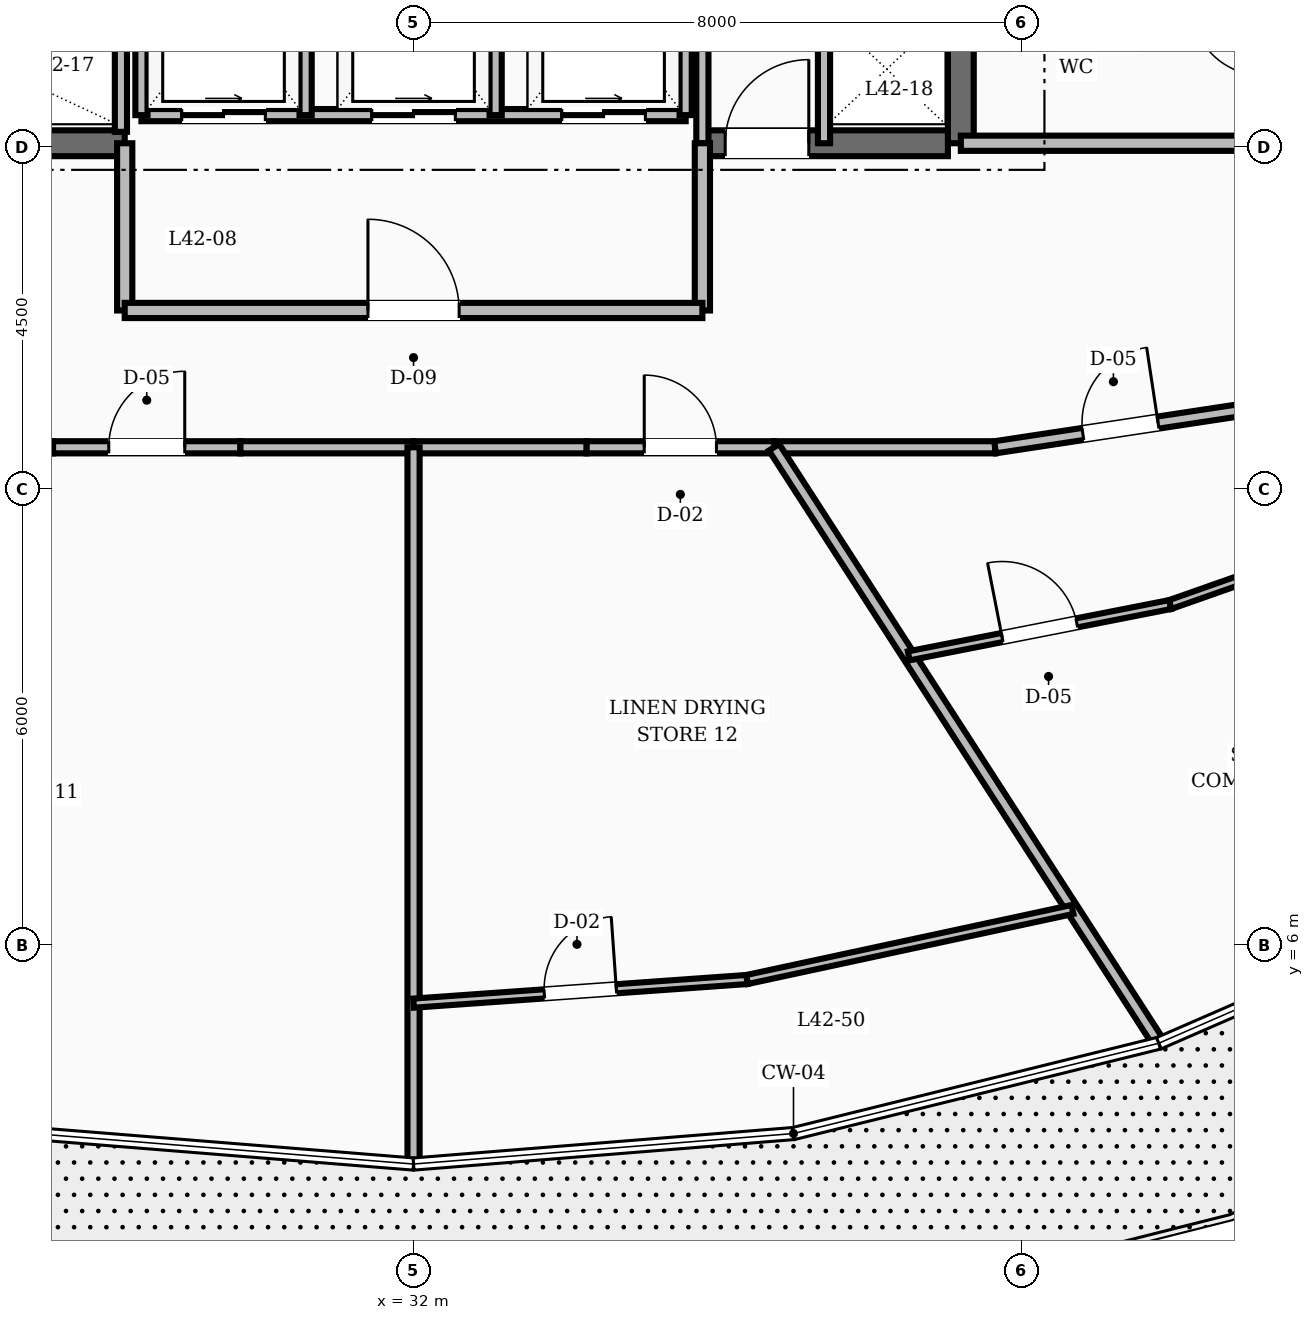
"""IFC4 building model, lengths in metres.
Left out: names, types, materials, properties, quantities, classifications, styles, units other than length and angle.
Written with IfcOpenShell. Run it as: python <this file> out.ifc"""

import sys

from ifc_helpers import new_model, si_unit, direction, frame, frame_2d, origin, place, context, subcontext, project, spatial, rectangle, extrude, element, fill, save


model = new_model("IFC4")
c1 = context("Model", 3, precision=1e-05, world=origin(), true_north=direction((0.0, 1.0)))
c2 = subcontext(c1, "Body", "Model", "MODEL_VIEW")
j1 = project(units=[si_unit("LENGTHUNIT", "METRE"), si_unit("PLANEANGLEUNIT", "RADIAN")], contexts=[c1])
p1 = place(None, origin())
s1 = spatial("IfcSite", under=j1, at=p1, CompositionType="ELEMENT")
p2 = place(p1, origin())
s2 = spatial("IfcBuilding", under=s1, at=p2, CompositionType="ELEMENT")
p3 = place(p2, frame((0.0, 0.0, 164.0)))
s3 = spatial("IfcBuildingStorey", under=s2, at=p3, CompositionType="ELEMENT", Elevation=164.0)
p4 = place(p3, frame((39.2, 16.55, 0.0), z_axis=(0.0, 0.0, 1.0), x_axis=(0.0, 1.0, 0.0)))
e1 = element("IfcWall", 1, at=p4, inside=s3, PredefinedType="SHEAR", context=c2, shape_type="SweptSolid", body=[
    extrude(rectangle(XDim=6.3, YDim=0.34, at=frame_2d((3.15, 0.0))), origin(), (0.0, 0.0, 1.0), 3.6),
])
p5 = place(p3, frame((24.97, 16.55, 0.0), z_axis=(0.0, 0.0, 1.0), x_axis=(1.0, 0.0, 0.0)))
e2 = element("IfcWall", 2, at=p5, inside=s3, PredefinedType="SHEAR", context=c2, shape_type="SweptSolid", body=[
    extrude(rectangle(XDim=3.23, YDim=0.34, at=frame_2d((1.615, 0.0))), origin(), (0.0, 0.0, 1.0), 3.6),
])
p6 = place(p3, frame((35.8, 16.55, 0.0), z_axis=(0.0, 0.0, 1.0), x_axis=(1.0, 0.0, 0.0)))
e3 = element("IfcWall", 3, at=p6, inside=s3, PredefinedType="SHEAR", context=c2, shape_type="SweptSolid", body=[
    extrude(rectangle(XDim=3.23, YDim=0.34, at=frame_2d((1.615, 0.0))), origin(), (0.0, 0.0, 1.0), 3.6),
])
p7 = place(p6, frame((0.3, 0.0, 0.0)))
e4 = element("IfcOpeningElement", 4, at=p7, cuts=e3, PredefinedType="OPENING", context=c2, shape_type="SweptSolid", body=[
    extrude(rectangle(XDim=1.1, YDim=2.1, at=frame_2d((0.55, 1.05))), frame((0.0, 0.18, 0.0), z_axis=(0.0, -1.0, 0.0), x_axis=(1.0, 0.0, 0.0)), (0.0, 0.0, 1.0), 0.36),
])
p8 = place(p3, frame((39.2, 16.55, 0.0), z_axis=(0.0, 0.0, 1.0), x_axis=(1.0, 0.0, 0.0)))
e5 = element("IfcWall", 5, at=p8, inside=s3, PredefinedType="SOLIDWALL", context=c2, shape_type="SweptSolid", body=[
    extrude(rectangle(XDim=3.98, YDim=0.2, at=frame_2d((1.99, 0.0))), origin(), (0.0, 0.0, 1.0), 2.8),
])
p9 = place(p3, frame((35.8, 16.55, 0.0), z_axis=(0.0, 0.0, 1.0), x_axis=(0.0, 1.0, 0.0)))
e6 = element("IfcWall", 6, at=p9, inside=s3, PredefinedType="SOLIDWALL", context=c2, shape_type="SweptSolid", body=[
    extrude(rectangle(XDim=3.3, YDim=0.16, at=frame_2d((1.65, 0.0))), origin(), (0.0, 0.0, 1.0), 2.8),
])
p10 = place(p3, frame((37.4, 16.55, 0.0), z_axis=(0.0, 0.0, 1.0), x_axis=(0.0, 1.0, 0.0)))
e7 = element("IfcWall", 7, at=p10, inside=s3, PredefinedType="SOLIDWALL", context=c2, shape_type="SweptSolid", body=[
    extrude(rectangle(XDim=1.75, YDim=0.16, at=frame_2d((0.875, 0.0))), origin(), (0.0, 0.0, 1.0), 2.8),
])
for number, where, z_axis, x_axis in (
    (8, (28.2, 14.35, 0.0), (0.0, 0.0, 1.0), (0.0, 1.0, 0.0)),
    (9, (35.8, 14.35, 0.0), (0.0, 0.0, 1.0), (0.0, 1.0, 0.0)),
):
    element("IfcWall", number, at=place(p3, frame(where, z_axis=z_axis, x_axis=x_axis)), inside=s3, PredefinedType="SOLIDWALL", context=c2, shape_type="SweptSolid", body=[
        extrude(rectangle(XDim=2.2, YDim=0.2, at=frame_2d((1.1, 0.0))), origin(), (0.0, 0.0, 1.0), 2.8),
    ])
p11 = place(p3, frame((28.2, 14.35, 0.0), z_axis=(0.0, 0.0, 1.0), x_axis=(1.0, 0.0, 0.0)))
e10 = element("IfcWall", 10, at=p11, inside=s3, PredefinedType="SOLIDWALL", context=c2, shape_type="SweptSolid", body=[
    extrude(rectangle(XDim=7.6, YDim=0.2, at=frame_2d((3.8, 0.0))), origin(), (0.0, 0.0, 1.0), 2.8),
])
p12 = place(p11, frame((3.2, 0.0, 0.0)))
e11 = element("IfcOpeningElement", 11, at=p12, cuts=e10, PredefinedType="OPENING", context=c2, shape_type="SweptSolid", body=[
    extrude(rectangle(XDim=1.2, YDim=2.1, at=frame_2d((0.6, 1.05))), frame((0.0, 0.11, 0.0), z_axis=(0.0, -1.0, 0.0), x_axis=(1.0, 0.0, 0.0)), (0.0, 0.0, 1.0), 0.22),
])
p13 = place(p3, frame((28.42, 16.92, 0.0), z_axis=(0.0, 0.0, 1.0), x_axis=(1.0, 0.0, 0.0)))
e12 = element("IfcWall", 12, at=p13, inside=s3, PredefinedType="SOLIDWALL", context=c2, shape_type="SweptSolid", body=[
    extrude(rectangle(XDim=7.16, YDim=0.16, at=frame_2d((3.58, 0.0))), origin(), (0.0, 0.0, 1.0), 2.8),
])
p14 = place(p13, frame((0.53, 0.0, 0.0)))
e13 = element("IfcOpeningElement", 13, at=p14, cuts=e12, PredefinedType="OPENING", context=c2, shape_type="SweptSolid", body=[
    extrude(rectangle(XDim=1.1, YDim=2.15, at=frame_2d((0.55, 1.075))), frame((0.0, 0.09, 0.0), z_axis=(0.0, -1.0, 0.0), x_axis=(1.0, 0.0, 0.0)), (0.0, 0.0, 1.0), 0.18),
])
p15 = place(p13, frame((3.03, 0.0, 0.0)))
e14 = element("IfcOpeningElement", 14, at=p15, cuts=e12, PredefinedType="OPENING", context=c2, shape_type="SweptSolid", body=[
    extrude(rectangle(XDim=1.1, YDim=2.15, at=frame_2d((0.55, 1.075))), frame((0.0, 0.09, 0.0), z_axis=(0.0, -1.0, 0.0), x_axis=(1.0, 0.0, 0.0)), (0.0, 0.0, 1.0), 0.18),
])
p16 = place(p13, frame((5.53, 0.0, 0.0)))
e15 = element("IfcOpeningElement", 15, at=p16, cuts=e12, PredefinedType="OPENING", context=c2, shape_type="SweptSolid", body=[
    extrude(rectangle(XDim=1.1, YDim=2.15, at=frame_2d((0.55, 1.075))), frame((0.0, 0.09, 0.0), z_axis=(0.0, -1.0, 0.0), x_axis=(1.0, 0.0, 0.0)), (0.0, 0.0, 1.0), 0.18),
])
for number, where, z_axis, x_axis in (
    (16, (28.42, 16.92, 0.0), (0.0, 0.0, 1.0), (0.0, 1.0, 0.0)),
    (17, (30.58, 16.92, 0.0), (0.0, 0.0, 1.0), (0.0, 1.0, 0.0)),
    (18, (33.08, 16.92, 0.0), (0.0, 0.0, 1.0), (0.0, 1.0, 0.0)),
    (19, (35.58, 16.92, 0.0), (0.0, 0.0, 1.0), (0.0, 1.0, 0.0)),
):
    element("IfcWall", number, at=place(p3, frame(where, z_axis=z_axis, x_axis=x_axis)), inside=s3, PredefinedType="SOLIDWALL", context=c2, shape_type="SweptSolid", body=[
        extrude(rectangle(XDim=2.76, YDim=0.16, at=frame_2d((1.38, 0.0))), origin(), (0.0, 0.0, 1.0), 2.8),
    ])
p17 = place(p3, frame((28.15, 16.7, 0.0), z_axis=(0.0, 0.0, 1.0), x_axis=(0.0, 1.0, 0.0)))
e20 = element("IfcWall", 20, at=p17, inside=s3, PredefinedType="SOLIDWALL", context=c2, shape_type="SweptSolid", body=[
    extrude(rectangle(XDim=6.05, YDim=0.16, at=frame_2d((3.025, 0.0))), origin(), (0.0, 0.0, 1.0), 2.8),
])
p18 = place(p3, frame((24.349, 12.55, 0.0), z_axis=(0.0, 0.0, 1.0), x_axis=(1.0, 0.0, 0.0)))
e21 = element("IfcWall", 21, at=p18, inside=s3, PredefinedType="SOLIDWALL", context=c2, shape_type="SweptSolid", body=[
    extrude(rectangle(XDim=2.908, YDim=0.16, at=frame_2d((1.454, 0.0))), origin(), (0.0, 0.0, 1.0), 2.8),
])
p19 = place(p3, frame((27.257, 12.55, 0.0), z_axis=(0.0, 0.0, 1.0), x_axis=(1.0, 0.0, 0.0)))
e22 = element("IfcWall", 22, at=p19, inside=s3, PredefinedType="SOLIDWALL", context=c2, shape_type="SweptSolid", body=[
    extrude(rectangle(XDim=2.465, YDim=0.16, at=frame_2d((1.232, 0.0))), origin(), (0.0, 0.0, 1.0), 2.8),
])
p20 = place(p19, frame((0.733, 0.0, 0.0)))
e23 = element("IfcOpeningElement", 23, at=p20, cuts=e22, PredefinedType="OPENING", context=c2, shape_type="SweptSolid", body=[
    extrude(rectangle(XDim=1.0, YDim=2.1, at=frame_2d((0.5, 1.05))), frame((0.0, 0.09, 0.0), z_axis=(0.0, -1.0, 0.0), x_axis=(1.0, 0.0, 0.0)), (0.0, 0.0, 1.0), 0.18),
])
for number, where, z_axis, x_axis in (
    (24, (29.722, 12.55, 0.0), (0.0, 0.0, 1.0), (1.0, 0.0, 0.0)),
    (25, (32.0, 12.55, 0.0), (0.0, 0.0, 1.0), (1.0, 0.0, 0.0)),
):
    element("IfcWall", number, at=place(p3, frame(where, z_axis=z_axis, x_axis=x_axis)), inside=s3, PredefinedType="SOLIDWALL", context=c2, shape_type="SweptSolid", body=[
        extrude(rectangle(XDim=2.278, YDim=0.16, at=frame_2d((1.139, 0.0))), origin(), (0.0, 0.0, 1.0), 2.8),
    ])
p21 = place(p3, frame((34.278, 12.55, 0.0), z_axis=(0.0, 0.0, 1.0), x_axis=(1.0, 0.0, 0.0)))
e26 = element("IfcWall", 26, at=p21, inside=s3, PredefinedType="SOLIDWALL", context=c2, shape_type="SweptSolid", body=[
    extrude(rectangle(XDim=2.465, YDim=0.16, at=frame_2d((1.232, 0.0))), origin(), (0.0, 0.0, 1.0), 2.8),
])
p22 = place(p21, frame((0.758, 0.0, 0.0)))
e27 = element("IfcOpeningElement", 27, at=p22, cuts=e26, PredefinedType="OPENING", context=c2, shape_type="SweptSolid", body=[
    extrude(rectangle(XDim=0.95, YDim=2.1, at=frame_2d((0.475, 1.05))), frame((0.0, 0.09, 0.0), z_axis=(0.0, -1.0, 0.0), x_axis=(1.0, 0.0, 0.0)), (0.0, 0.0, 1.0), 0.18),
])
p23 = place(p3, frame((36.743, 12.55, 0.0), z_axis=(0.0, 0.0, 1.0), x_axis=(1.0, 0.0, 0.0)))
e28 = element("IfcWall", 28, at=p23, inside=s3, PredefinedType="SOLIDWALL", context=c2, shape_type="SweptSolid", body=[
    extrude(rectangle(XDim=2.908, YDim=0.16, at=frame_2d((1.454, 0.0))), origin(), (0.0, 0.0, 1.0), 2.8),
])
p24 = place(p3, frame((39.651, 12.55, 0.0), z_axis=(0.0, 0.0, 1.0), x_axis=(0.988710906508, 0.149835721217, 0.0)))
e29 = element("IfcWall", 29, at=p24, inside=s3, PredefinedType="SOLIDWALL", context=c2, shape_type="SweptSolid", body=[
    extrude(rectangle(XDim=3.337, YDim=0.16, at=frame_2d((1.668, 0.0))), origin(), (0.0, 0.0, 1.0), 2.8),
])
p25 = place(p24, frame((1.168, 0.0, 0.0)))
e30 = element("IfcOpeningElement", 30, at=p25, cuts=e29, PredefinedType="OPENING", context=c2, shape_type="SweptSolid", body=[
    extrude(rectangle(XDim=1.0, YDim=2.1, at=frame_2d((0.5, 1.05))), frame((0.0, 0.09, 0.0), z_axis=(0.0, -1.0, 0.0), x_axis=(1.0, 0.0, 0.0)), (0.0, 0.0, 1.0), 0.18),
])
p26 = place(p3, frame((36.743, 12.55, 0.0), z_axis=(0.0, 0.0, 1.0), x_axis=(0.542459310628, -0.840082077129, 0.0)))
e31 = element("IfcWall", 31, at=p26, inside=s3, PredefinedType="SOLIDWALL", context=c2, shape_type="SweptSolid", body=[
    extrude(rectangle(XDim=9.282, YDim=0.16, at=frame_2d((4.641, 0.0))), origin(), (0.0, 0.0, 1.0), 2.8),
])
p27 = place(p3, frame((38.515, 9.806, 0.0), z_axis=(0.0, 0.0, 1.0), x_axis=(0.981276091141, 0.192606419819, 0.0)))
e32 = element("IfcWall", 32, at=p27, inside=s3, PredefinedType="PARTITIONING", context=c2, shape_type="SweptSolid", body=[
    extrude(rectangle(XDim=3.506, YDim=0.12, at=frame_2d((1.753, 0.0))), origin(), (0.0, 0.0, 1.0), 2.8),
])
p28 = place(p27, frame((1.253, 0.0, 0.0)))
e33 = element("IfcOpeningElement", 33, at=p28, cuts=e32, PredefinedType="OPENING", context=c2, shape_type="SweptSolid", body=[
    extrude(rectangle(XDim=1.0, YDim=2.1, at=frame_2d((0.5, 1.05))), frame((0.0, 0.07, 0.0), z_axis=(0.0, -1.0, 0.0), x_axis=(1.0, 0.0, 0.0)), (0.0, 0.0, 1.0), 0.14),
])
p29 = place(p3, frame((41.955, 10.481, 0.0), z_axis=(0.0, 0.0, 1.0), x_axis=(0.943218228091, 0.332173710875, 0.0)))
e34 = element("IfcWall", 34, at=p29, inside=s3, PredefinedType="PARTITIONING", context=c2, shape_type="SweptSolid", body=[
    extrude(rectangle(XDim=3.715, YDim=0.12, at=frame_2d((1.857, 0.0))), origin(), (0.0, 0.0, 1.0), 2.8),
])
p30 = place(p3, frame((32.0, 12.55, 0.0), z_axis=(0.0, 0.0, 1.0), x_axis=(0.0, -1.0, 0.0)))
e35 = element("IfcWall", 35, at=p30, inside=s3, PredefinedType="SOLIDWALL", context=c2, shape_type="SweptSolid", body=[
    extrude(rectangle(XDim=9.38, YDim=0.16, at=frame_2d((4.69, 0.0))), origin(), (0.0, 0.0, 1.0), 2.8),
])
p31 = place(p3, frame((32.0, 5.237, 0.0), z_axis=(0.0, 0.0, 1.0), x_axis=(0.997496872259, 0.070710606235, 0.0)))
e36 = element("IfcWall", 36, at=p31, inside=s3, PredefinedType="PARTITIONING", context=c2, shape_type="SweptSolid", body=[
    extrude(rectangle(XDim=4.399, YDim=0.12, at=frame_2d((2.199, 0.0))), origin(), (0.0, 0.0, 1.0), 2.8),
])
p32 = place(p31, frame((1.724, 0.0, 0.0)))
e37 = element("IfcOpeningElement", 37, at=p32, cuts=e36, PredefinedType="OPENING", context=c2, shape_type="SweptSolid", body=[
    extrude(rectangle(XDim=0.95, YDim=2.1, at=frame_2d((0.475, 1.05))), frame((0.0, 0.07, 0.0), z_axis=(0.0, -1.0, 0.0), x_axis=(1.0, 0.0, 0.0)), (0.0, 0.0, 1.0), 0.14),
])
p33 = place(p3, frame((36.388, 5.548, 0.0), z_axis=(0.0, 0.0, 1.0), x_axis=(0.977604548962, 0.210450340576, 0.0)))
e38 = element("IfcWall", 38, at=p33, inside=s3, PredefinedType="PARTITIONING", context=c2, shape_type="SweptSolid", body=[
    extrude(rectangle(XDim=4.379, YDim=0.12, at=frame_2d((2.19, 0.0))), origin(), (0.0, 0.0, 1.0), 2.8),
])
p34 = place(p7, origin())
e39 = element("IfcDoor", 39, at=p34, inside=s3, OperationType="SINGLE_SWING_RIGHT", PredefinedType="DOOR", context=c2, shape_type="SweptSolid", body=[
    extrude(rectangle(XDim=1.1, YDim=2.1, at=frame_2d((0.55, 1.05))), frame((0.0, 0.025, 0.0), z_axis=(0.0, -1.0, 0.0), x_axis=(1.0, 0.0, 0.0)), (0.0, 0.0, 1.0), 0.05),
])
fill(e4, e39)
p35 = place(p12, origin())
e40 = element("IfcDoor", 40, at=p35, inside=s3, OperationType="SINGLE_SWING_LEFT", PredefinedType="DOOR", context=c2, shape_type="SweptSolid", body=[
    extrude(rectangle(XDim=1.2, YDim=2.1, at=frame_2d((0.6, 1.05))), frame((0.0, 0.025, 0.0), z_axis=(0.0, -1.0, 0.0), x_axis=(1.0, 0.0, 0.0)), (0.0, 0.0, 1.0), 0.05),
])
fill(e11, e40)
p36 = place(p14, origin())
e41 = element("IfcDoor", 41, at=p36, inside=s3, OperationType="SLIDING_TO_RIGHT", PredefinedType="DOOR", context=c2, shape_type="SweptSolid", body=[
    extrude(rectangle(XDim=1.1, YDim=2.15, at=frame_2d((0.55, 1.075))), frame((0.0, 0.025, 0.0), z_axis=(0.0, -1.0, 0.0), x_axis=(1.0, 0.0, 0.0)), (0.0, 0.0, 1.0), 0.05),
])
fill(e13, e41)
p37 = place(p15, origin())
e42 = element("IfcDoor", 42, at=p37, inside=s3, OperationType="SLIDING_TO_RIGHT", PredefinedType="DOOR", context=c2, shape_type="SweptSolid", body=[
    extrude(rectangle(XDim=1.1, YDim=2.15, at=frame_2d((0.55, 1.075))), frame((0.0, 0.025, 0.0), z_axis=(0.0, -1.0, 0.0), x_axis=(1.0, 0.0, 0.0)), (0.0, 0.0, 1.0), 0.05),
])
fill(e14, e42)
p38 = place(p16, origin())
e43 = element("IfcDoor", 43, at=p38, inside=s3, OperationType="SLIDING_TO_RIGHT", PredefinedType="DOOR", context=c2, shape_type="SweptSolid", body=[
    extrude(rectangle(XDim=1.1, YDim=2.15, at=frame_2d((0.55, 1.075))), frame((0.0, 0.025, 0.0), z_axis=(0.0, -1.0, 0.0), x_axis=(1.0, 0.0, 0.0)), (0.0, 0.0, 1.0), 0.05),
])
fill(e15, e43)
p39 = place(p25, origin())
e44 = element("IfcDoor", 44, at=p39, inside=s3, OperationType="SINGLE_SWING_RIGHT", PredefinedType="DOOR", context=c2, shape_type="SweptSolid", body=[
    extrude(rectangle(XDim=1.0, YDim=2.1, at=frame_2d((0.5, 1.05))), frame((0.0, 0.025, 0.0), z_axis=(0.0, -1.0, 0.0), x_axis=(1.0, 0.0, 0.0)), (0.0, 0.0, 1.0), 0.05),
])
fill(e30, e44)
p40 = place(p28, origin())
e45 = element("IfcDoor", 45, at=p40, inside=s3, OperationType="SINGLE_SWING_LEFT", PredefinedType="DOOR", context=c2, shape_type="SweptSolid", body=[
    extrude(rectangle(XDim=1.0, YDim=2.1, at=frame_2d((0.5, 1.05))), frame((0.0, 0.025, 0.0), z_axis=(0.0, -1.0, 0.0), x_axis=(1.0, 0.0, 0.0)), (0.0, 0.0, 1.0), 0.05),
])
fill(e33, e45)
p41 = place(p20, origin())
e46 = element("IfcDoor", 46, at=p41, inside=s3, OperationType="SINGLE_SWING_RIGHT", PredefinedType="DOOR", context=c2, shape_type="SweptSolid", body=[
    extrude(rectangle(XDim=1.0, YDim=2.1, at=frame_2d((0.5, 1.05))), frame((0.0, 0.025, 0.0), z_axis=(0.0, -1.0, 0.0), x_axis=(1.0, 0.0, 0.0)), (0.0, 0.0, 1.0), 0.05),
])
fill(e23, e46)
p42 = place(p22, origin())
e47 = element("IfcDoor", 47, at=p42, inside=s3, OperationType="SINGLE_SWING_LEFT", PredefinedType="DOOR", context=c2, shape_type="SweptSolid", body=[
    extrude(rectangle(XDim=0.95, YDim=2.1, at=frame_2d((0.475, 1.05))), frame((0.0, 0.025, 0.0), z_axis=(0.0, -1.0, 0.0), x_axis=(1.0, 0.0, 0.0)), (0.0, 0.0, 1.0), 0.05),
])
fill(e27, e47)
p43 = place(p32, origin())
e48 = element("IfcDoor", 48, at=p43, inside=s3, OperationType="SINGLE_SWING_RIGHT", PredefinedType="DOOR", context=c2, shape_type="SweptSolid", body=[
    extrude(rectangle(XDim=0.95, YDim=2.1, at=frame_2d((0.475, 1.05))), frame((0.0, 0.025, 0.0), z_axis=(0.0, -1.0, 0.0), x_axis=(1.0, 0.0, 0.0)), (0.0, 0.0, 1.0), 0.05),
])
fill(e37, e48)
save(model, sys.argv[1])
